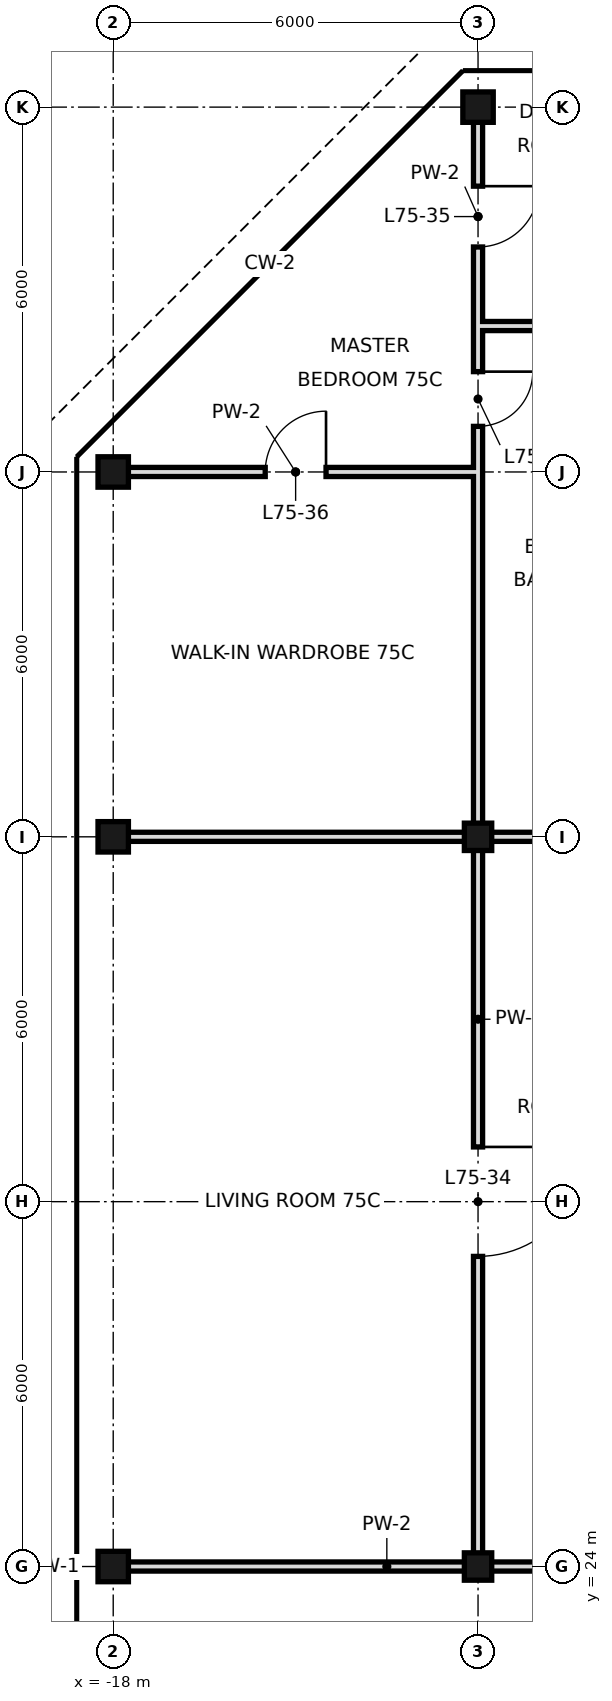
"""IFC4 building model, lengths in metres.
Left out: names, types, materials, properties, quantities, classifications, styles, units other than length and angle.
Written with IfcOpenShell. Run it as: python <this file> out.ifc"""

import sys

from ifc_helpers import new_model, si_unit, direction, frame, frame_2d, origin, origin_2d, place, context, subcontext, project, spatial, rectangle, hollow_rectangle, extrude, element, fill, save


model = new_model("IFC4")
c1 = context("Model", 3, precision=1e-05, world=origin(), true_north=direction((0.0, 1.0)))
c2 = subcontext(c1, "Body", "Model", "MODEL_VIEW")
j1 = project(units=[si_unit("LENGTHUNIT", "METRE"), si_unit("PLANEANGLEUNIT", "RADIAN")], contexts=[c1])
p1 = place(None, origin())
s1 = spatial("IfcSite", under=j1, at=p1, CompositionType="ELEMENT")
p2 = place(p1, origin())
s2 = spatial("IfcBuilding", under=s1, at=p2, CompositionType="ELEMENT")
p3 = place(p2, frame((0.0, 0.0, 316.0)))
s3 = spatial("IfcBuildingStorey", under=s2, at=p3, CompositionType="ELEMENT", Elevation=316.0)
for number, where, z_axis, x_axis in (
    (1, (-18.0, 24.0, 0.0), (0.0, 0.0, 1.0), (1.0, 0.0, 0.0)),
    (2, (-18.0, 36.0, 0.0), (0.0, 0.0, 1.0), (1.0, 0.0, 0.0)),
    (3, (-18.0, 42.0, 0.0), (0.0, 0.0, 1.0), (1.0, 0.0, 0.0)),
):
    element("IfcColumn", number, at=place(p3, frame(where, z_axis=z_axis, x_axis=x_axis)), inside=s3, PredefinedType="COLUMN", context=c2, shape_type="SweptSolid", body=[
        extrude(hollow_rectangle(XDim=0.5, YDim=0.5, WallThickness=0.025, at=origin_2d()), origin(), (0.0, 0.0, 1.0), 3.6),
    ])
for number, where, z_axis, x_axis in (
    (4, (-12.0, 24.0, 0.0), (0.0, 0.0, 1.0), (1.0, 0.0, 0.0)),
    (5, (-12.0, 36.0, 0.0), (0.0, 0.0, 1.0), (1.0, 0.0, 0.0)),
):
    element("IfcColumn", number, at=place(p3, frame(where, z_axis=z_axis, x_axis=x_axis)), inside=s3, PredefinedType="COLUMN", context=c2, shape_type="SweptSolid", body=[
        extrude(hollow_rectangle(XDim=0.45, YDim=0.45, WallThickness=0.022, at=origin_2d()), origin(), (0.0, 0.0, 1.0), 3.6),
    ])
p4 = place(p3, frame((-12.0, 48.0, 0.0), z_axis=(0.0, 0.0, 1.0), x_axis=(1.0, 0.0, 0.0)))
e6 = element("IfcColumn", 6, at=p4, inside=s3, PredefinedType="COLUMN", context=c2, shape_type="SweptSolid", body=[
    extrude(hollow_rectangle(XDim=0.5, YDim=0.5, WallThickness=0.025, at=origin_2d()), origin(), (0.0, 0.0, 1.0), 3.6),
])
p5 = place(p3, frame((-12.0, 24.0, 0.0), z_axis=(0.0, 0.0, 1.0), x_axis=(0.0, 1.0, 0.0)))
e7 = element("IfcWall", 7, at=p5, inside=s3, PredefinedType="PARTITIONING", context=c2, shape_type="SweptSolid", body=[
    extrude(rectangle(XDim=12.0, YDim=0.15, at=frame_2d((6.0, 0.0))), origin(), (0.0, 0.0, 1.0), 2.72),
])
p6 = place(p5, frame((5.1, 0.0, 0.0)))
e8 = element("IfcOpeningElement", 8, at=p6, cuts=e7, PredefinedType="OPENING", context=c2, shape_type="SweptSolid", body=[
    extrude(rectangle(XDim=1.8, YDim=2.4, at=frame_2d((0.9, 1.2))), frame((0.0, 0.085, 0.0), z_axis=(0.0, -1.0, 0.0), x_axis=(1.0, 0.0, 0.0)), (0.0, 0.0, 1.0), 0.17),
])
p7 = place(p3, frame((-12.0, 44.4, 0.0), z_axis=(0.0, 0.0, 1.0), x_axis=(0.0, 1.0, 0.0)))
e9 = element("IfcWall", 9, at=p7, inside=s3, PredefinedType="PARTITIONING", context=c2, shape_type="SweptSolid", body=[
    extrude(rectangle(XDim=3.6, YDim=0.15, at=frame_2d((1.8, 0.0))), origin(), (0.0, 0.0, 1.0), 2.72),
])
p8 = place(p7, frame((1.3, 0.0, 0.0)))
e10 = element("IfcOpeningElement", 10, at=p8, cuts=e9, PredefinedType="OPENING", context=c2, shape_type="SweptSolid", body=[
    extrude(rectangle(XDim=1.0, YDim=2.4, at=frame_2d((0.5, 1.2))), frame((0.0, 0.085, 0.0), z_axis=(0.0, -1.0, 0.0), x_axis=(1.0, 0.0, 0.0)), (0.0, 0.0, 1.0), 0.17),
])
p9 = place(p3, frame((-12.0, 36.0, 0.0), z_axis=(0.0, 0.0, 1.0), x_axis=(0.0, 1.0, 0.0)))
e11 = element("IfcWall", 11, at=p9, inside=s3, PredefinedType="PARTITIONING", context=c2, shape_type="SweptSolid", body=[
    extrude(rectangle(XDim=8.4, YDim=0.15, at=frame_2d((4.2, 0.0))), origin(), (0.0, 0.0, 1.0), 2.72),
])
p10 = place(p9, frame((6.75, 0.0, 0.0)))
e12 = element("IfcOpeningElement", 12, at=p10, cuts=e11, PredefinedType="OPENING", context=c2, shape_type="SweptSolid", body=[
    extrude(rectangle(XDim=0.9, YDim=2.4, at=frame_2d((0.45, 1.2))), frame((0.0, 0.085, 0.0), z_axis=(0.0, -1.0, 0.0), x_axis=(1.0, 0.0, 0.0)), (0.0, 0.0, 1.0), 0.17),
])
p11 = place(p3, frame((-18.0, 24.0, 0.0), z_axis=(0.0, 0.0, 1.0), x_axis=(1.0, 0.0, 0.0)))
e13 = element("IfcWall", 13, at=p11, inside=s3, PredefinedType="PARTITIONING", context=c2, shape_type="SweptSolid", body=[
    extrude(rectangle(XDim=9.0, YDim=0.15, at=frame_2d((4.5, 0.0))), origin(), (0.0, 0.0, 1.0), 2.72),
])
p12 = place(p3, frame((-18.0, 36.0, 0.0), z_axis=(0.0, 0.0, 1.0), x_axis=(1.0, 0.0, 0.0)))
e14 = element("IfcWall", 14, at=p12, inside=s3, PredefinedType="PARTITIONING", context=c2, shape_type="SweptSolid", body=[
    extrude(rectangle(XDim=6.0, YDim=0.15, at=frame_2d((3.0, 0.0))), origin(), (0.0, 0.0, 1.0), 2.97),
])
p13 = place(p3, frame((-12.0, 36.0, 0.0), z_axis=(0.0, 0.0, 1.0), x_axis=(1.0, 0.0, 0.0)))
e15 = element("IfcWall", 15, at=p13, inside=s3, PredefinedType="PARTITIONING", context=c2, shape_type="SweptSolid", body=[
    extrude(rectangle(XDim=3.0, YDim=0.15, at=frame_2d((1.5, 0.0))), origin(), (0.0, 0.0, 1.0), 2.72),
])
p14 = place(p3, frame((-18.0, 42.0, 0.0), z_axis=(0.0, 0.0, 1.0), x_axis=(1.0, 0.0, 0.0)))
e16 = element("IfcWall", 16, at=p14, inside=s3, PredefinedType="PARTITIONING", context=c2, shape_type="SweptSolid", body=[
    extrude(rectangle(XDim=6.0, YDim=0.15, at=frame_2d((3.0, 0.0))), origin(), (0.0, 0.0, 1.0), 2.97),
])
p15 = place(p14, frame((2.5, 0.0, 0.0)))
e17 = element("IfcOpeningElement", 17, at=p15, cuts=e16, PredefinedType="OPENING", context=c2, shape_type="SweptSolid", body=[
    extrude(rectangle(XDim=1.0, YDim=2.4, at=frame_2d((0.5, 1.2))), frame((0.0, 0.085, 0.0), z_axis=(0.0, -1.0, 0.0), x_axis=(1.0, 0.0, 0.0)), (0.0, 0.0, 1.0), 0.17),
])
p16 = place(p3, frame((-12.0, 44.4, 0.0), z_axis=(0.0, 0.0, 1.0), x_axis=(1.0, 0.0, 0.0)))
e18 = element("IfcWall", 18, at=p16, inside=s3, PredefinedType="PARTITIONING", context=c2, shape_type="SweptSolid", body=[
    extrude(rectangle(XDim=3.0, YDim=0.15, at=frame_2d((1.5, 0.0))), origin(), (0.0, 0.0, 1.0), 3.42),
])
p17 = place(p6, origin())
e19 = element("IfcDoor", 19, at=p17, inside=s3, OperationType="SINGLE_SWING_RIGHT", PredefinedType="DOOR", context=c2, shape_type="SweptSolid", body=[
    extrude(rectangle(XDim=1.8, YDim=2.4, at=frame_2d((0.9, 1.2))), frame((0.0, 0.025, 0.0), z_axis=(0.0, -1.0, 0.0), x_axis=(1.0, 0.0, 0.0)), (0.0, 0.0, 1.0), 0.05),
])
fill(e8, e19)
p18 = place(p8, origin())
e20 = element("IfcDoor", 20, at=p18, inside=s3, OperationType="SINGLE_SWING_RIGHT", PredefinedType="DOOR", context=c2, shape_type="SweptSolid", body=[
    extrude(rectangle(XDim=1.0, YDim=2.4, at=frame_2d((0.5, 1.2))), frame((0.0, 0.025, 0.0), z_axis=(0.0, -1.0, 0.0), x_axis=(1.0, 0.0, 0.0)), (0.0, 0.0, 1.0), 0.05),
])
fill(e10, e20)
p19 = place(p15, frame((1.0, 0.0, 0.0), z_axis=(0.0, 0.0, 1.0), x_axis=(-1.0, 0.0, 0.0)))
e21 = element("IfcDoor", 21, at=p19, inside=s3, OperationType="SINGLE_SWING_LEFT", PredefinedType="DOOR", context=c2, shape_type="SweptSolid", body=[
    extrude(rectangle(XDim=1.0, YDim=2.4, at=frame_2d((0.5, 1.2))), frame((0.0, 0.025, 0.0), z_axis=(0.0, -1.0, 0.0), x_axis=(1.0, 0.0, 0.0)), (0.0, 0.0, 1.0), 0.05),
])
fill(e17, e21)
p20 = place(p10, origin())
e22 = element("IfcDoor", 22, at=p20, inside=s3, OperationType="SINGLE_SWING_RIGHT", PredefinedType="DOOR", context=c2, shape_type="SweptSolid", body=[
    extrude(rectangle(XDim=0.9, YDim=2.4, at=frame_2d((0.45, 1.2))), frame((0.0, 0.025, 0.0), z_axis=(0.0, -1.0, 0.0), x_axis=(1.0, 0.0, 0.0)), (0.0, 0.0, 1.0), 0.05),
])
fill(e12, e22)
save(model, sys.argv[1])
